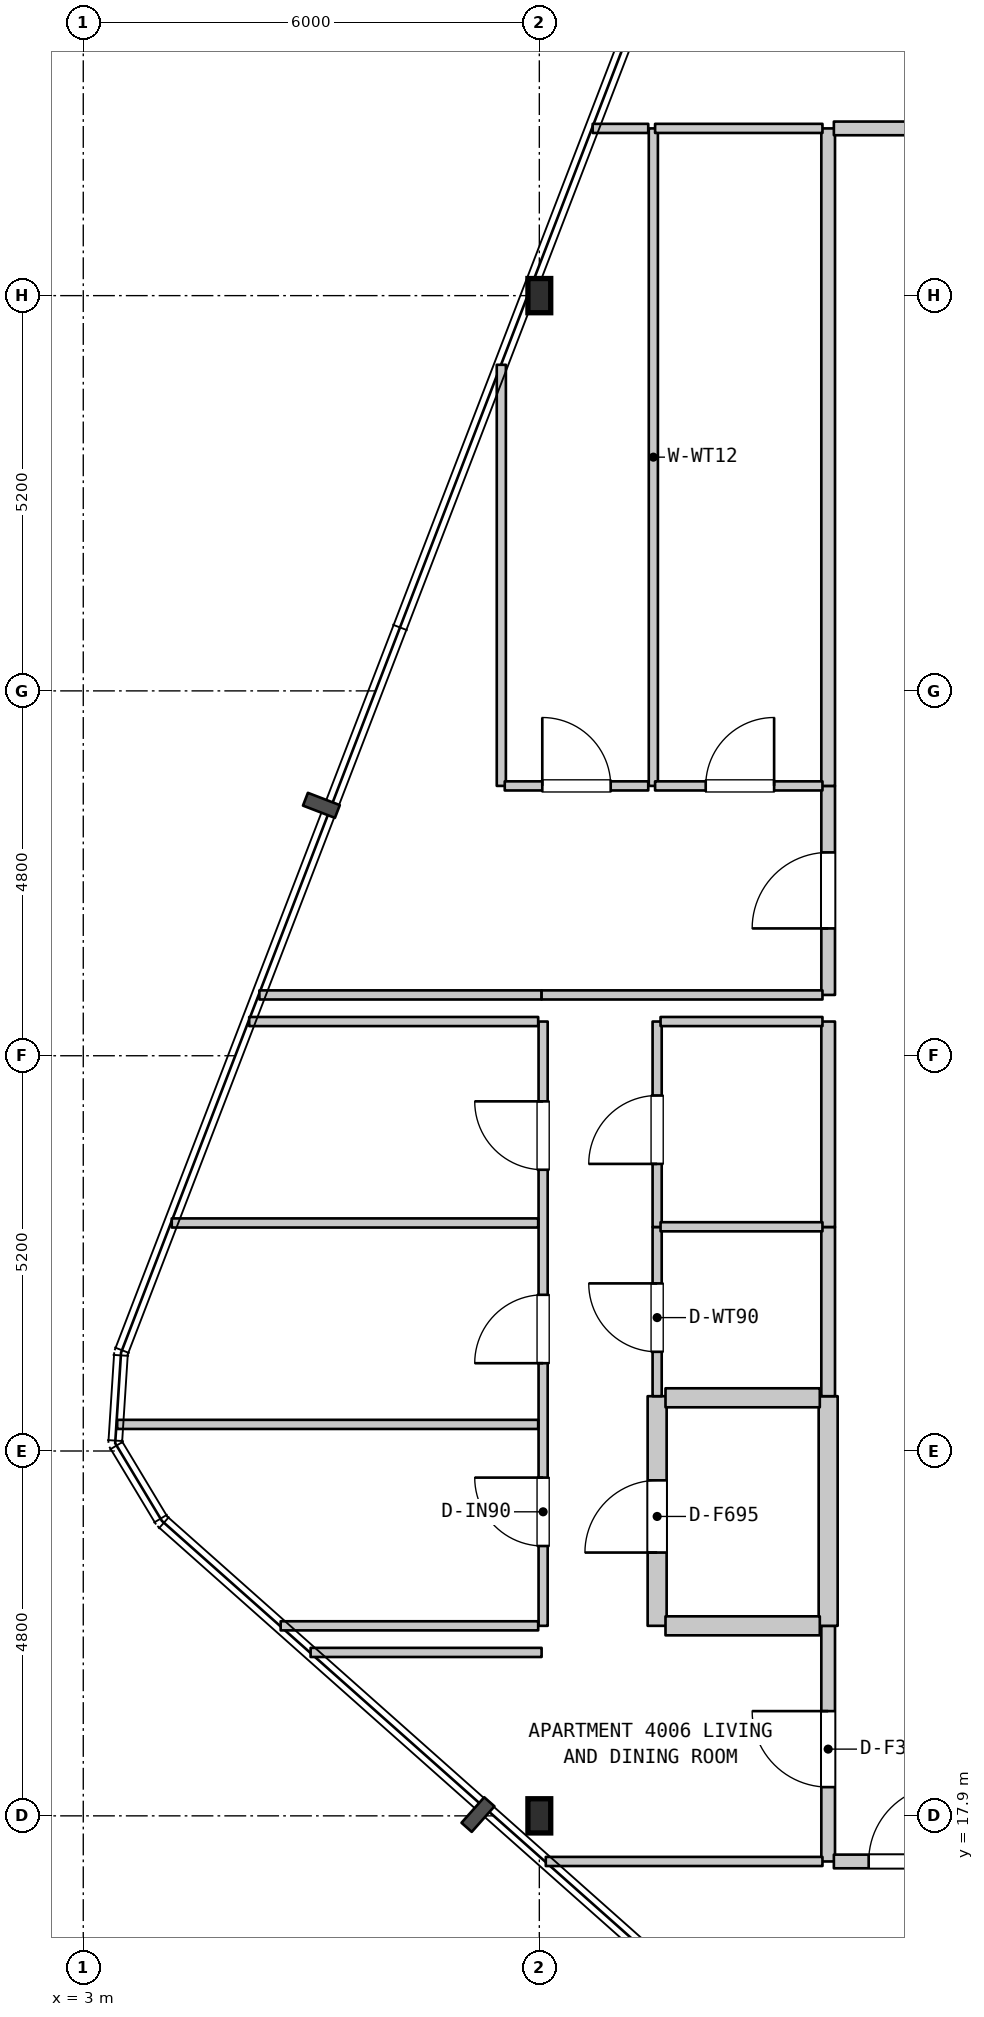
"""IFC4 building model, lengths in metres.
Left out: names, types, materials, properties, quantities, classifications, styles, units other than length and angle.
Written with IfcOpenShell. Run it as: python <this file> out.ifc"""

import sys

from ifc_helpers import new_model, si_unit, direction, frame, frame_2d, origin, origin_2d, place, context, subcontext, project, spatial, rectangle, i_section, extrude, element, fill, save


model = new_model("IFC4")
c1 = context("Model", 3, precision=1e-05, world=origin(), true_north=direction((0.0, 1.0)))
c2 = subcontext(c1, "Body", "Model", "MODEL_VIEW")
j1 = project(units=[si_unit("LENGTHUNIT", "METRE"), si_unit("PLANEANGLEUNIT", "RADIAN")], contexts=[c1])
p1 = place(None, origin())
s1 = spatial("IfcSite", under=j1, at=p1, CompositionType="ELEMENT")
p2 = place(p1, origin())
s2 = spatial("IfcBuilding", under=s1, at=p2, CompositionType="ELEMENT")
p3 = place(p2, frame((0.0, 0.0, 164.6)))
s3 = spatial("IfcBuildingStorey", under=s2, at=p3, CompositionType="ELEMENT", Elevation=164.6)
for number, where, z_axis, x_axis in (
    (1, (9.0, 17.9, 0.0), (0.0, 0.0, 1.0), (1.0, 0.0, 0.0)),
    (2, (9.0, 37.9, 0.0), (0.0, 0.0, 1.0), (1.0, 0.0, 0.0)),
):
    element("IfcColumn", number, at=place(p3, frame(where, z_axis=z_axis, x_axis=x_axis)), inside=s3, PredefinedType="COLUMN", context=c2, shape_type="SweptSolid", body=[
        extrude(i_section(OverallWidth=0.3, OverallDepth=0.45, WebThickness=0.014, FlangeThickness=0.026, FilletRadius=0.027, at=origin_2d()), origin(), (0.0, 0.0, 1.0), 4.5),
    ])
p4 = place(p3, frame((8.5, 31.45, 0.0), z_axis=(0.0, 0.0, 1.0), x_axis=(0.0, 1.0, 0.0)))
e3 = element("IfcWall", 3, at=p4, inside=s3, PredefinedType="PARTITIONING", context=c2, shape_type="SweptSolid", body=[
    extrude(rectangle(XDim=5.54, YDim=0.12, at=frame_2d((2.77, 0.0))), origin(), (0.0, 0.0, 1.0), 4.19),
])
p5 = place(p3, frame((9.05, 20.4, 0.0), z_axis=(0.0, 0.0, 1.0), x_axis=(0.0, 1.0, 0.0)))
e4 = element("IfcWall", 4, at=p5, inside=s3, PredefinedType="PARTITIONING", context=c2, shape_type="SweptSolid", body=[
    extrude(rectangle(XDim=7.95, YDim=0.12, at=frame_2d((3.975, 0.0))), origin(), (0.0, 0.0, 1.0), 3.59),
])
p6 = place(p5, frame((1.05, 0.0, 0.0)))
e5 = element("IfcOpeningElement", 5, at=p6, cuts=e4, PredefinedType="OPENING", context=c2, shape_type="SweptSolid", body=[
    extrude(rectangle(XDim=0.9, YDim=2.15, at=frame_2d((0.45, 1.075))), frame((0.0, 0.07, 0.0), z_axis=(0.0, -1.0, 0.0), x_axis=(1.0, 0.0, 0.0)), (0.0, 0.0, 1.0), 0.14),
])
p7 = place(p5, frame((3.455, 0.0, 0.0)))
e6 = element("IfcOpeningElement", 6, at=p7, cuts=e4, PredefinedType="OPENING", context=c2, shape_type="SweptSolid", body=[
    extrude(rectangle(XDim=0.9, YDim=2.15, at=frame_2d((0.45, 1.075))), frame((0.0, 0.07, 0.0), z_axis=(0.0, -1.0, 0.0), x_axis=(1.0, 0.0, 0.0)), (0.0, 0.0, 1.0), 0.14),
])
p8 = place(p5, frame((6.0, 0.0, 0.0)))
e7 = element("IfcOpeningElement", 7, at=p8, cuts=e4, PredefinedType="OPENING", context=c2, shape_type="SweptSolid", body=[
    extrude(rectangle(XDim=0.9, YDim=2.15, at=frame_2d((0.45, 1.075))), frame((0.0, 0.07, 0.0), z_axis=(0.0, -1.0, 0.0), x_axis=(1.0, 0.0, 0.0)), (0.0, 0.0, 1.0), 0.14),
])
p9 = place(p3, frame((10.5, 31.45, 0.0), z_axis=(0.0, 0.0, 1.0), x_axis=(0.0, 1.0, 0.0)))
e8 = element("IfcWall", 8, at=p9, inside=s3, PredefinedType="PARTITIONING", context=c2, shape_type="SweptSolid", body=[
    extrude(rectangle(XDim=8.65, YDim=0.12, at=frame_2d((4.325, 0.0))), origin(), (0.0, 0.0, 1.0), 4.19),
])
p10 = place(p3, frame((10.55, 20.4, 0.0), z_axis=(0.0, 0.0, 1.0), x_axis=(0.0, 1.0, 0.0)))
e9 = element("IfcWall", 9, at=p10, inside=s3, PredefinedType="STANDARD", context=c2, shape_type="SweptSolid", body=[
    extrude(rectangle(XDim=3.021, YDim=0.25, at=frame_2d((1.51, 0.0))), origin(), (0.0, 0.0, 1.0), 4.19),
])
p11 = place(p10, frame((0.964, 0.0, 0.0)))
e10 = element("IfcOpeningElement", 10, at=p11, cuts=e9, PredefinedType="OPENING", context=c2, shape_type="SweptSolid", body=[
    extrude(rectangle(XDim=0.95, YDim=2.15, at=frame_2d((0.475, 1.075))), frame((0.0, 0.135, 0.0), z_axis=(0.0, -1.0, 0.0), x_axis=(1.0, 0.0, 0.0)), (0.0, 0.0, 1.0), 0.27),
])
p12 = place(p3, frame((10.55, 23.421, 0.0), z_axis=(0.0, 0.0, 1.0), x_axis=(0.0, 1.0, 0.0)))
e11 = element("IfcWall", 11, at=p12, inside=s3, PredefinedType="PARTITIONING", context=c2, shape_type="SweptSolid", body=[
    extrude(rectangle(XDim=2.226, YDim=0.12, at=frame_2d((1.113, 0.0))), origin(), (0.0, 0.0, 1.0), 4.19),
])
p13 = place(p12, frame((0.584, 0.0, 0.0)))
e12 = element("IfcOpeningElement", 12, at=p13, cuts=e11, PredefinedType="OPENING", context=c2, shape_type="SweptSolid", body=[
    extrude(rectangle(XDim=0.9, YDim=2.1, at=frame_2d((0.45, 1.05))), frame((0.0, 0.07, 0.0), z_axis=(0.0, -1.0, 0.0), x_axis=(1.0, 0.0, 0.0)), (0.0, 0.0, 1.0), 0.14),
])
p14 = place(p3, frame((10.55, 25.647, 0.0), z_axis=(0.0, 0.0, 1.0), x_axis=(0.0, 1.0, 0.0)))
e13 = element("IfcWall", 13, at=p14, inside=s3, PredefinedType="PARTITIONING", context=c2, shape_type="SweptSolid", body=[
    extrude(rectangle(XDim=2.703, YDim=0.12, at=frame_2d((1.352, 0.0))), origin(), (0.0, 0.0, 1.0), 4.19),
])
p15 = place(p14, frame((0.83, 0.0, 0.0)))
e14 = element("IfcOpeningElement", 14, at=p15, cuts=e13, PredefinedType="OPENING", context=c2, shape_type="SweptSolid", body=[
    extrude(rectangle(XDim=0.9, YDim=2.15, at=frame_2d((0.45, 1.075))), frame((0.0, 0.07, 0.0), z_axis=(0.0, -1.0, 0.0), x_axis=(1.0, 0.0, 0.0)), (0.0, 0.0, 1.0), 0.14),
])
p16 = place(p3, frame((12.8, 17.3, 0.0), z_axis=(0.0, 0.0, 1.0), x_axis=(0.0, 1.0, 0.0)))
e15 = element("IfcWall", 15, at=p16, inside=s3, PredefinedType="STANDARD", context=c2, shape_type="SweptSolid", body=[
    extrude(rectangle(XDim=3.1, YDim=0.18, at=frame_2d((1.55, 0.0))), origin(), (0.0, 0.0, 1.0), 4.19),
])
p17 = place(p16, frame((0.978, 0.0, 0.0)))
e16 = element("IfcOpeningElement", 16, at=p17, cuts=e15, PredefinedType="OPENING", context=c2, shape_type="SweptSolid", body=[
    extrude(rectangle(XDim=1.0, YDim=2.15, at=frame_2d((0.5, 1.075))), frame((0.0, 0.1, 0.0), z_axis=(0.0, -1.0, 0.0), x_axis=(1.0, 0.0, 0.0)), (0.0, 0.0, 1.0), 0.2),
])
p18 = place(p3, frame((12.8, 20.4, 0.0), z_axis=(0.0, 0.0, 1.0), x_axis=(0.0, 1.0, 0.0)))
e17 = element("IfcWall", 17, at=p18, inside=s3, PredefinedType="STANDARD", context=c2, shape_type="SweptSolid", body=[
    extrude(rectangle(XDim=3.021, YDim=0.25, at=frame_2d((1.51, 0.0))), origin(), (0.0, 0.0, 1.0), 4.19),
])
p19 = place(p3, frame((12.8, 23.421, 0.0), z_axis=(0.0, 0.0, 1.0), x_axis=(0.0, 1.0, 0.0)))
e18 = element("IfcWall", 18, at=p19, inside=s3, PredefinedType="STANDARD", context=c2, shape_type="SweptSolid", body=[
    extrude(rectangle(XDim=2.226, YDim=0.18, at=frame_2d((1.113, 0.0))), origin(), (0.0, 0.0, 1.0), 4.19),
])
p20 = place(p3, frame((12.8, 25.647, 0.0), z_axis=(0.0, 0.0, 1.0), x_axis=(0.0, 1.0, 0.0)))
e19 = element("IfcWall", 19, at=p20, inside=s3, PredefinedType="STANDARD", context=c2, shape_type="SweptSolid", body=[
    extrude(rectangle(XDim=2.703, YDim=0.18, at=frame_2d((1.352, 0.0))), origin(), (0.0, 0.0, 1.0), 4.19),
])
p21 = place(p3, frame((12.8, 28.7, 0.0), z_axis=(0.0, 0.0, 1.0), x_axis=(0.0, 1.0, 0.0)))
e20 = element("IfcWall", 20, at=p21, inside=s3, PredefinedType="STANDARD", context=c2, shape_type="SweptSolid", body=[
    extrude(rectangle(XDim=2.75, YDim=0.18, at=frame_2d((1.375, 0.0))), origin(), (0.0, 0.0, 1.0), 4.19),
])
p22 = place(p21, frame((0.875, 0.0, 0.0)))
e21 = element("IfcOpeningElement", 21, at=p22, cuts=e20, PredefinedType="OPENING", context=c2, shape_type="SweptSolid", body=[
    extrude(rectangle(XDim=1.0, YDim=2.15, at=frame_2d((0.5, 1.075))), frame((0.0, 0.1, 0.0), z_axis=(0.0, -1.0, 0.0), x_axis=(1.0, 0.0, 0.0)), (0.0, 0.0, 1.0), 0.2),
])
p23 = place(p3, frame((12.8, 31.45, 0.0), z_axis=(0.0, 0.0, 1.0), x_axis=(0.0, 1.0, 0.0)))
e22 = element("IfcWall", 22, at=p23, inside=s3, PredefinedType="STANDARD", context=c2, shape_type="SweptSolid", body=[
    extrude(rectangle(XDim=8.65, YDim=0.18, at=frame_2d((4.325, 0.0))), origin(), (0.0, 0.0, 1.0), 4.19),
])
p24 = place(p3, frame((9.085, 17.3, 0.0), z_axis=(0.0, 0.0, 1.0), x_axis=(1.0, 0.0, 0.0)))
e23 = element("IfcWall", 23, at=p24, inside=s3, PredefinedType="PARTITIONING", context=c2, shape_type="SweptSolid", body=[
    extrude(rectangle(XDim=3.64, YDim=0.12, at=frame_2d((1.82, 0.0))), origin(), (0.0, 0.0, 1.0), 4.19),
])
p25 = place(p3, frame((12.875, 17.3, 0.0), z_axis=(0.0, 0.0, 1.0), x_axis=(1.0, 0.0, 0.0)))
e24 = element("IfcWall", 24, at=p25, inside=s3, PredefinedType="STANDARD", context=c2, shape_type="SweptSolid", body=[
    extrude(rectangle(XDim=3.78, YDim=0.18, at=frame_2d((1.89, 0.0))), origin(), (0.0, 0.0, 1.0), 4.19),
])
p26 = place(p25, frame((0.458, 0.0, 0.0)))
e25 = element("IfcOpeningElement", 25, at=p26, cuts=e24, PredefinedType="OPENING", context=c2, shape_type="SweptSolid", body=[
    extrude(rectangle(XDim=1.0, YDim=2.15, at=frame_2d((0.5, 1.075))), frame((0.0, 0.1, 0.0), z_axis=(0.0, -1.0, 0.0), x_axis=(1.0, 0.0, 0.0)), (0.0, 0.0, 1.0), 0.2),
])
p27 = place(p3, frame((5.991, 20.05, 0.0), z_axis=(0.0, 0.0, 1.0), x_axis=(1.0, 0.0, 0.0)))
e26 = element("IfcWall", 26, at=p27, inside=s3, PredefinedType="PARTITIONING", context=c2, shape_type="SweptSolid", body=[
    extrude(rectangle(XDim=3.039, YDim=0.12, at=frame_2d((1.52, 0.0))), origin(), (0.0, 0.0, 1.0), 4.19),
])
p28 = place(p3, frame((5.597, 20.4, 0.0), z_axis=(0.0, 0.0, 1.0), x_axis=(1.0, 0.0, 0.0)))
e27 = element("IfcWall", 27, at=p28, inside=s3, PredefinedType="PARTITIONING", context=c2, shape_type="SweptSolid", body=[
    extrude(rectangle(XDim=3.388, YDim=0.12, at=frame_2d((1.694, 0.0))), origin(), (0.0, 0.0, 1.0), 4.19),
])
p29 = place(p3, frame((10.66, 20.4, 0.0), z_axis=(0.0, 0.0, 1.0), x_axis=(1.0, 0.0, 0.0)))
e28 = element("IfcWall", 28, at=p29, inside=s3, PredefinedType="STANDARD", context=c2, shape_type="SweptSolid", body=[
    extrude(rectangle(XDim=2.03, YDim=0.25, at=frame_2d((1.015, 0.0))), origin(), (0.0, 0.0, 1.0), 4.19),
])
p30 = place(p3, frame((3.446, 23.05, 0.0), z_axis=(0.0, 0.0, 1.0), x_axis=(1.0, 0.0, 0.0)))
e29 = element("IfcWall", 29, at=p30, inside=s3, PredefinedType="PARTITIONING", context=c2, shape_type="SweptSolid", body=[
    extrude(rectangle(XDim=5.539, YDim=0.12, at=frame_2d((2.77, 0.0))), origin(), (0.0, 0.0, 1.0), 4.19),
])
p31 = place(p3, frame((10.66, 23.4, 0.0), z_axis=(0.0, 0.0, 1.0), x_axis=(1.0, 0.0, 0.0)))
e30 = element("IfcWall", 30, at=p31, inside=s3, PredefinedType="STANDARD", context=c2, shape_type="SweptSolid", body=[
    extrude(rectangle(XDim=2.03, YDim=0.25, at=frame_2d((1.015, 0.0))), origin(), (0.0, 0.0, 1.0), 4.19),
])
p32 = place(p3, frame((10.595, 25.65, 0.0), z_axis=(0.0, 0.0, 1.0), x_axis=(1.0, 0.0, 0.0)))
e31 = element("IfcWall", 31, at=p32, inside=s3, PredefinedType="PARTITIONING", context=c2, shape_type="SweptSolid", body=[
    extrude(rectangle(XDim=2.13, YDim=0.12, at=frame_2d((1.065, 0.0))), origin(), (0.0, 0.0, 1.0), 4.19),
])
p33 = place(p3, frame((4.164, 25.7, 0.0), z_axis=(0.0, 0.0, 1.0), x_axis=(1.0, 0.0, 0.0)))
e32 = element("IfcWall", 32, at=p33, inside=s3, PredefinedType="PARTITIONING", context=c2, shape_type="SweptSolid", body=[
    extrude(rectangle(XDim=4.821, YDim=0.12, at=frame_2d((2.411, 0.0))), origin(), (0.0, 0.0, 1.0), 4.19),
])
p34 = place(p3, frame((5.183, 28.35, 0.0), z_axis=(0.0, 0.0, 1.0), x_axis=(1.0, 0.0, 0.0)))
e33 = element("IfcWall", 33, at=p34, inside=s3, PredefinedType="PARTITIONING", context=c2, shape_type="SweptSolid", body=[
    extrude(rectangle(XDim=3.802, YDim=0.12, at=frame_2d((1.901, 0.0))), origin(), (0.0, 0.0, 1.0), 4.19),
])
p35 = place(p3, frame((10.595, 28.35, 0.0), z_axis=(0.0, 0.0, 1.0), x_axis=(1.0, 0.0, 0.0)))
e34 = element("IfcWall", 34, at=p35, inside=s3, PredefinedType="PARTITIONING", context=c2, shape_type="SweptSolid", body=[
    extrude(rectangle(XDim=2.13, YDim=0.12, at=frame_2d((1.065, 0.0))), origin(), (0.0, 0.0, 1.0), 4.19),
])
p36 = place(p3, frame((5.317, 28.7, 0.0), z_axis=(0.0, 0.0, 1.0), x_axis=(1.0, 0.0, 0.0)))
e35 = element("IfcWall", 35, at=p36, inside=s3, PredefinedType="PARTITIONING", context=c2, shape_type="SweptSolid", body=[
    extrude(rectangle(XDim=3.713, YDim=0.12, at=frame_2d((1.856, 0.0))), origin(), (0.0, 0.0, 1.0), 4.19),
])
p37 = place(p3, frame((9.03, 28.7, 0.0), z_axis=(0.0, 0.0, 1.0), x_axis=(1.0, 0.0, 0.0)))
e36 = element("IfcWall", 36, at=p37, inside=s3, PredefinedType="PARTITIONING", context=c2, shape_type="SweptSolid", body=[
    extrude(rectangle(XDim=3.695, YDim=0.12, at=frame_2d((1.848, 0.0))), origin(), (0.0, 0.0, 1.0), 4.19),
])
p38 = place(p3, frame((8.545, 31.45, 0.0), z_axis=(0.0, 0.0, 1.0), x_axis=(1.0, 0.0, 0.0)))
e37 = element("IfcWall", 37, at=p38, inside=s3, PredefinedType="PARTITIONING", context=c2, shape_type="SweptSolid", body=[
    extrude(rectangle(XDim=1.888, YDim=0.12, at=frame_2d((0.944, 0.0))), origin(), (0.0, 0.0, 1.0), 4.19),
])
p39 = place(p38, frame((0.494, 0.0, 0.0)))
e38 = element("IfcOpeningElement", 38, at=p39, cuts=e37, PredefinedType="OPENING", context=c2, shape_type="SweptSolid", body=[
    extrude(rectangle(XDim=0.9, YDim=2.15, at=frame_2d((0.45, 1.075))), frame((0.0, 0.07, 0.0), z_axis=(0.0, -1.0, 0.0), x_axis=(1.0, 0.0, 0.0)), (0.0, 0.0, 1.0), 0.14),
])
p40 = place(p3, frame((10.523, 31.45, 0.0), z_axis=(0.0, 0.0, 1.0), x_axis=(1.0, 0.0, 0.0)))
e39 = element("IfcWall", 39, at=p40, inside=s3, PredefinedType="PARTITIONING", context=c2, shape_type="SweptSolid", body=[
    extrude(rectangle(XDim=2.202, YDim=0.12, at=frame_2d((1.101, 0.0))), origin(), (0.0, 0.0, 1.0), 4.19),
])
p41 = place(p40, frame((0.666, 0.0, 0.0)))
e40 = element("IfcOpeningElement", 40, at=p41, cuts=e39, PredefinedType="OPENING", context=c2, shape_type="SweptSolid", body=[
    extrude(rectangle(XDim=0.9, YDim=2.1, at=frame_2d((0.45, 1.05))), frame((0.0, 0.07, 0.0), z_axis=(0.0, -1.0, 0.0), x_axis=(1.0, 0.0, 0.0)), (0.0, 0.0, 1.0), 0.14),
])
p42 = place(p3, frame((9.702, 40.1, 0.0), z_axis=(0.0, 0.0, 1.0), x_axis=(1.0, 0.0, 0.0)))
e41 = element("IfcWall", 41, at=p42, inside=s3, PredefinedType="PARTITIONING", context=c2, shape_type="SweptSolid", body=[
    extrude(rectangle(XDim=0.731, YDim=0.12, at=frame_2d((0.366, 0.0))), origin(), (0.0, 0.0, 1.0), 4.19),
])
p43 = place(p3, frame((10.523, 40.1, 0.0), z_axis=(0.0, 0.0, 1.0), x_axis=(1.0, 0.0, 0.0)))
e42 = element("IfcWall", 42, at=p43, inside=s3, PredefinedType="PARTITIONING", context=c2, shape_type="SweptSolid", body=[
    extrude(rectangle(XDim=2.202, YDim=0.12, at=frame_2d((1.101, 0.0))), origin(), (0.0, 0.0, 1.0), 4.19),
])
p44 = place(p3, frame((12.875, 40.1, 0.0), z_axis=(0.0, 0.0, 1.0), x_axis=(1.0, 0.0, 0.0)))
e43 = element("IfcWall", 43, at=p44, inside=s3, PredefinedType="STANDARD", context=c2, shape_type="SweptSolid", body=[
    extrude(rectangle(XDim=1.48, YDim=0.18, at=frame_2d((0.74, 0.0))), origin(), (0.0, 0.0, 1.0), 4.19),
])
p45 = place(p6, origin())
e44 = element("IfcDoor", 44, at=p45, inside=s3, OperationType="SINGLE_SWING_RIGHT", PredefinedType="DOOR", context=c2, shape_type="SweptSolid", body=[
    extrude(rectangle(XDim=0.9, YDim=2.15, at=frame_2d((0.45, 1.075))), frame((0.0, 0.025, 0.0), z_axis=(0.0, -1.0, 0.0), x_axis=(1.0, 0.0, 0.0)), (0.0, 0.0, 1.0), 0.05),
])
fill(e5, e44)
p46 = place(p7, origin())
e45 = element("IfcDoor", 45, at=p46, inside=s3, OperationType="SINGLE_SWING_LEFT", PredefinedType="DOOR", context=c2, shape_type="SweptSolid", body=[
    extrude(rectangle(XDim=0.9, YDim=2.15, at=frame_2d((0.45, 1.075))), frame((0.0, 0.025, 0.0), z_axis=(0.0, -1.0, 0.0), x_axis=(1.0, 0.0, 0.0)), (0.0, 0.0, 1.0), 0.05),
])
fill(e6, e45)
p47 = place(p8, origin())
e46 = element("IfcDoor", 46, at=p47, inside=s3, OperationType="SINGLE_SWING_RIGHT", PredefinedType="DOOR", context=c2, shape_type="SweptSolid", body=[
    extrude(rectangle(XDim=0.9, YDim=2.15, at=frame_2d((0.45, 1.075))), frame((0.0, 0.025, 0.0), z_axis=(0.0, -1.0, 0.0), x_axis=(1.0, 0.0, 0.0)), (0.0, 0.0, 1.0), 0.05),
])
fill(e7, e46)
p48 = place(p11, origin())
e47 = element("IfcDoor", 47, at=p48, inside=s3, OperationType="SINGLE_SWING_LEFT", PredefinedType="DOOR", context=c2, shape_type="SweptSolid", body=[
    extrude(rectangle(XDim=0.95, YDim=2.15, at=frame_2d((0.475, 1.075))), frame((0.0, 0.025, 0.0), z_axis=(0.0, -1.0, 0.0), x_axis=(1.0, 0.0, 0.0)), (0.0, 0.0, 1.0), 0.05),
])
fill(e10, e47)
p49 = place(p13, origin())
e48 = element("IfcDoor", 48, at=p49, inside=s3, OperationType="SINGLE_SWING_RIGHT", PredefinedType="DOOR", context=c2, shape_type="SweptSolid", body=[
    extrude(rectangle(XDim=0.9, YDim=2.1, at=frame_2d((0.45, 1.05))), frame((0.0, 0.025, 0.0), z_axis=(0.0, -1.0, 0.0), x_axis=(1.0, 0.0, 0.0)), (0.0, 0.0, 1.0), 0.05),
])
fill(e12, e48)
p50 = place(p15, origin())
e49 = element("IfcDoor", 49, at=p50, inside=s3, OperationType="SINGLE_SWING_LEFT", PredefinedType="DOOR", context=c2, shape_type="SweptSolid", body=[
    extrude(rectangle(XDim=0.9, YDim=2.15, at=frame_2d((0.45, 1.075))), frame((0.0, 0.025, 0.0), z_axis=(0.0, -1.0, 0.0), x_axis=(1.0, 0.0, 0.0)), (0.0, 0.0, 1.0), 0.05),
])
fill(e14, e49)
p51 = place(p17, origin())
e50 = element("IfcDoor", 50, at=p51, inside=s3, OperationType="SINGLE_SWING_RIGHT", PredefinedType="DOOR", context=c2, shape_type="SweptSolid", body=[
    extrude(rectangle(XDim=1.0, YDim=2.15, at=frame_2d((0.5, 1.075))), frame((0.0, 0.025, 0.0), z_axis=(0.0, -1.0, 0.0), x_axis=(1.0, 0.0, 0.0)), (0.0, 0.0, 1.0), 0.05),
])
fill(e16, e50)
p52 = place(p22, origin())
e51 = element("IfcDoor", 51, at=p52, inside=s3, OperationType="SINGLE_SWING_LEFT", PredefinedType="DOOR", context=c2, shape_type="SweptSolid", body=[
    extrude(rectangle(XDim=1.0, YDim=2.15, at=frame_2d((0.5, 1.075))), frame((0.0, 0.025, 0.0), z_axis=(0.0, -1.0, 0.0), x_axis=(1.0, 0.0, 0.0)), (0.0, 0.0, 1.0), 0.05),
])
fill(e21, e51)
p53 = place(p26, origin())
e52 = element("IfcDoor", 52, at=p53, inside=s3, OperationType="SINGLE_SWING_RIGHT", PredefinedType="DOOR", context=c2, shape_type="SweptSolid", body=[
    extrude(rectangle(XDim=1.0, YDim=2.15, at=frame_2d((0.5, 1.075))), frame((0.0, 0.025, 0.0), z_axis=(0.0, -1.0, 0.0), x_axis=(1.0, 0.0, 0.0)), (0.0, 0.0, 1.0), 0.05),
])
fill(e25, e52)
p54 = place(p39, origin())
e53 = element("IfcDoor", 53, at=p54, inside=s3, OperationType="SINGLE_SWING_LEFT", PredefinedType="DOOR", context=c2, shape_type="SweptSolid", body=[
    extrude(rectangle(XDim=0.9, YDim=2.15, at=frame_2d((0.45, 1.075))), frame((0.0, 0.025, 0.0), z_axis=(0.0, -1.0, 0.0), x_axis=(1.0, 0.0, 0.0)), (0.0, 0.0, 1.0), 0.05),
])
fill(e38, e53)
p55 = place(p41, origin())
e54 = element("IfcDoor", 54, at=p55, inside=s3, OperationType="SINGLE_SWING_RIGHT", PredefinedType="DOOR", context=c2, shape_type="SweptSolid", body=[
    extrude(rectangle(XDim=0.9, YDim=2.1, at=frame_2d((0.45, 1.05))), frame((0.0, 0.025, 0.0), z_axis=(0.0, -1.0, 0.0), x_axis=(1.0, 0.0, 0.0)), (0.0, 0.0, 1.0), 0.05),
])
fill(e40, e54)
save(model, sys.argv[1])
